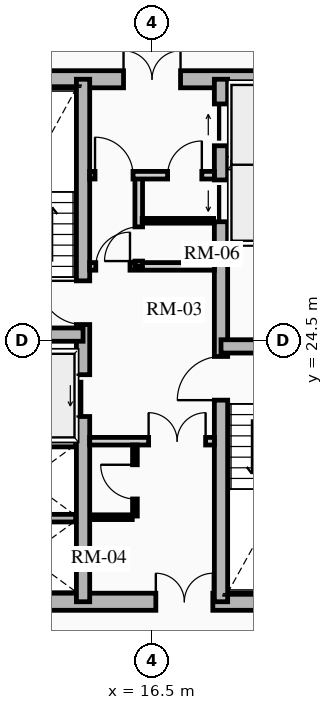
"""IFC4 building model, lengths in metres.
Left out: names, types, materials, properties, quantities, classifications, styles, units other than length and angle.
Written with IfcOpenShell. Run it as: python <this file> out.ifc"""

import sys

from ifc_helpers import new_model, si_unit, direction, frame, frame_2d, origin, place, context, subcontext, project, spatial, rectangle, extrude, source, transform, mapped, element, fill, save


model = new_model("IFC4")
c1 = context("Model", 3, precision=1e-05, world=origin(), true_north=direction((0.0, 1.0)))
c2 = subcontext(c1, "Body", "Model", "MODEL_VIEW")
j1 = project(units=[si_unit("LENGTHUNIT", "METRE"), si_unit("PLANEANGLEUNIT", "RADIAN")], contexts=[c1])
p1 = place(None, origin())
s1 = spatial("IfcSite", under=j1, at=p1, CompositionType="ELEMENT")
p2 = place(p1, origin())
s2 = spatial("IfcBuilding", under=s1, at=p2, CompositionType="ELEMENT")
p3 = place(p2, frame((0.0, 0.0, 107.98)))
s3 = spatial("IfcBuildingStorey", under=s2, at=p3, CompositionType="ELEMENT", Elevation=107.98)
p4 = place(p3, frame((11.15, 17.625, 0.0), z_axis=(0.0, 0.0, 1.0), x_axis=(1.0, 0.0, 0.0)))
e1 = element("IfcWall", 1, at=p4, inside=s3, PredefinedType="SHEAR", context=c2, shape_type="SweptSolid", body=[
    extrude(rectangle(XDim=10.7, YDim=0.45, at=frame_2d((5.35, 0.0))), origin(), (0.0, 0.0, 1.0), 2.91),
])
m1 = source(origin(), c2, "Body", "SweptSolid", [
    extrude(rectangle(XDim=1.5, YDim=2.02, at=frame_2d((0.75, 1.01))), frame((0.0, 0.235, 0.0), z_axis=(0.0, -1.0, 0.0), x_axis=(1.0, 0.0, 0.0)), (0.0, 0.0, 1.0), 0.47),
])
p5 = place(p4, frame((5.45, 0.0, 0.0)))
e2 = element("IfcOpeningElement", 2, at=p5, cuts=e1, PredefinedType="OPENING", context=c2, shape_type="MappedRepresentation", body=[
    mapped(m1, transform((0.0, 0.0, 0.0), x_axis=(1.0, 0.0, 0.0), y_axis=(0.0, 1.0, 0.0), z_axis=(0.0, 0.0, 1.0), scale=1.0)),
])
p6 = place(p3, frame((11.15, 31.375, 0.0), z_axis=(0.0, 0.0, 1.0), x_axis=(1.0, 0.0, 0.0)))
e3 = element("IfcWall", 3, at=p6, inside=s3, PredefinedType="SHEAR", context=c2, shape_type="SweptSolid", body=[
    extrude(rectangle(XDim=10.7, YDim=0.45, at=frame_2d((5.35, 0.0))), origin(), (0.0, 0.0, 1.0), 2.91),
])
p7 = place(p6, frame((4.6, 0.0, 0.0)))
e4 = element("IfcOpeningElement", 4, at=p7, cuts=e3, PredefinedType="OPENING", context=c2, shape_type="MappedRepresentation", body=[
    mapped(m1, transform((0.0, 0.0, 0.0), x_axis=(1.0, 0.0, 0.0), y_axis=(0.0, 1.0, 0.0), z_axis=(0.0, 0.0, 1.0), scale=1.0)),
])
p8 = place(p3, frame((14.685, 17.625, 0.0), z_axis=(0.0, 0.0, 1.0), x_axis=(0.0, 1.0, 0.0)))
e5 = element("IfcWall", 5, at=p8, inside=s3, PredefinedType="SHEAR", context=c2, shape_type="SweptSolid", body=[
    extrude(rectangle(XDim=13.75, YDim=0.35, at=frame_2d((6.875, 0.0))), origin(), (0.0, 0.0, 1.0), 2.91),
])
m2 = source(origin(), c2, "Body", "SweptSolid", [
    extrude(rectangle(XDim=1.1, YDim=2.015, at=frame_2d((0.55, 1.007))), frame((0.0, 0.185, 0.0), z_axis=(0.0, -1.0, 0.0), x_axis=(1.0, 0.0, 0.0)), (0.0, 0.0, 1.0), 0.37),
])
p9 = place(p8, frame((4.875, 0.0, 0.0)))
e6 = element("IfcOpeningElement", 6, at=p9, cuts=e5, PredefinedType="OPENING", context=c2, shape_type="MappedRepresentation", body=[
    mapped(m2, transform((0.0, 0.0, 0.0), x_axis=(1.0, 0.0, 0.0), y_axis=(0.0, 1.0, 0.0), z_axis=(0.0, 0.0, 1.0), scale=1.0)),
])
m3 = source(origin(), c2, "Body", "SweptSolid", [
    extrude(rectangle(XDim=1.15, YDim=2.02, at=frame_2d((0.575, 1.01))), frame((0.0, 0.185, 0.0), z_axis=(0.0, -1.0, 0.0), x_axis=(1.0, 0.0, 0.0)), (0.0, 0.0, 1.0), 0.37),
])
p10 = place(p8, frame((7.295, 0.0, 0.0)))
e7 = element("IfcOpeningElement", 7, at=p10, cuts=e5, PredefinedType="OPENING", context=c2, shape_type="MappedRepresentation", body=[
    mapped(m3, transform((0.0, 0.0, 0.0), x_axis=(1.0, 0.0, 0.0), y_axis=(0.0, 1.0, 0.0), z_axis=(0.0, 0.0, 1.0), scale=1.0)),
])
p11 = place(p3, frame((18.315, 17.625, 0.0), z_axis=(0.0, 0.0, 1.0), x_axis=(0.0, 1.0, 0.0)))
e8 = element("IfcWall", 8, at=p11, inside=s3, PredefinedType="SHEAR", context=c2, shape_type="SweptSolid", body=[
    extrude(rectangle(XDim=13.75, YDim=0.35, at=frame_2d((6.875, 0.0))), origin(), (0.0, 0.0, 1.0), 2.91),
])
p12 = place(p11, frame((10.0, 0.0, 0.0)))
e9 = element("IfcOpeningElement", 9, at=p12, cuts=e8, PredefinedType="OPENING", context=c2, shape_type="MappedRepresentation", body=[
    mapped(m2, transform((0.0, 0.0, 0.0), x_axis=(1.0, 0.0, 0.0), y_axis=(0.0, 1.0, 0.0), z_axis=(0.0, 0.0, 1.0), scale=1.0)),
])
p13 = place(p11, frame((12.0, 0.0, 0.0)))
e10 = element("IfcOpeningElement", 10, at=p13, cuts=e8, PredefinedType="OPENING", context=c2, shape_type="MappedRepresentation", body=[
    mapped(m2, transform((0.0, 0.0, 0.0), x_axis=(1.0, 0.0, 0.0), y_axis=(0.0, 1.0, 0.0), z_axis=(0.0, 0.0, 1.0), scale=1.0)),
])
p14 = place(p11, frame((5.305, 0.0, 0.0)))
e11 = element("IfcOpeningElement", 11, at=p14, cuts=e8, PredefinedType="OPENING", context=c2, shape_type="MappedRepresentation", body=[
    mapped(m3, transform((0.0, 0.0, 0.0), x_axis=(1.0, 0.0, 0.0), y_axis=(0.0, 1.0, 0.0), z_axis=(0.0, 0.0, 1.0), scale=1.0)),
])
for number, where, z_axis, x_axis in (
    (12, (11.4, 24.655, 0.0), (0.0, 0.0, 1.0), (1.0, 0.0, 0.0)),
    (13, (18.315, 24.345, 0.0), (0.0, 0.0, 1.0), (1.0, 0.0, 0.0)),
):
    element("IfcWall", number, at=place(p3, frame(where, z_axis=z_axis, x_axis=x_axis)), inside=s3, PredefinedType="SHEAR", context=c2, shape_type="SweptSolid", body=[
        extrude(rectangle(XDim=3.285, YDim=0.35, at=frame_2d((1.643, 0.0))), origin(), (0.0, 0.0, 1.0), 2.91),
    ])
for number, where, z_axis, x_axis in (
    (14, (11.52, 21.8, 0.0), (0.0, 0.0, 1.0), (1.0, 0.0, 0.0)),
    (15, (11.52, 19.825, 0.0), (0.0, 0.0, 1.0), (1.0, 0.0, 0.0)),
    (16, (18.51, 27.13, 0.0), (0.0, 0.0, 1.0), (1.0, 0.0, 0.0)),
    (17, (18.51, 29.175, 0.0), (0.0, 0.0, 1.0), (1.0, 0.0, 0.0)),
):
    element("IfcWall", number, at=place(p3, frame(where, z_axis=z_axis, x_axis=x_axis)), inside=s3, PredefinedType="SHEAR", context=c2, shape_type="SweptSolid", body=[
        extrude(rectangle(XDim=2.97, YDim=0.2, at=frame_2d((1.485, 0.0))), origin(), (0.0, 0.0, 1.0), 2.91),
    ])
p15 = place(p3, frame((14.86, 21.85, 0.0), z_axis=(0.0, 0.0, 1.0), x_axis=(1.0, 0.0, 0.0)))
e18 = element("IfcWall", 18, at=p15, inside=s3, PredefinedType="PARTITIONING", context=c2, shape_type="SweptSolid", body=[
    extrude(rectangle(XDim=3.28, YDim=0.2, at=frame_2d((1.64, 0.0))), origin(), (0.0, 0.0, 1.0), 2.655),
])
m4 = source(origin(), c2, "Body", "SweptSolid", [
    extrude(rectangle(XDim=1.5, YDim=2.02, at=frame_2d((0.75, 1.01))), frame((0.0, 0.11, 0.0), z_axis=(0.0, -1.0, 0.0), x_axis=(1.0, 0.0, 0.0)), (0.0, 0.0, 1.0), 0.22),
])
p16 = place(p15, frame((1.55, 0.0, 0.0)))
e19 = element("IfcOpeningElement", 19, at=p16, cuts=e18, PredefinedType="OPENING", context=c2, shape_type="MappedRepresentation", body=[
    mapped(m4, transform((0.0, 0.0, 0.0), x_axis=(1.0, 0.0, 0.0), y_axis=(0.0, 1.0, 0.0), z_axis=(0.0, 0.0, 1.0), scale=1.0)),
])
p17 = place(p3, frame((14.86, 26.45, 0.0), z_axis=(0.0, 0.0, 1.0), x_axis=(1.0, 0.0, 0.0)))
e20 = element("IfcWall", 20, at=p17, inside=s3, PredefinedType="PARTITIONING", context=c2, shape_type="SweptSolid", body=[
    extrude(rectangle(XDim=3.28, YDim=0.2, at=frame_2d((1.64, 0.0))), origin(), (0.0, 0.0, 1.0), 2.655),
])
m5 = source(origin(), c2, "Body", "SweptSolid", [
    extrude(rectangle(XDim=0.9, YDim=2.005, at=frame_2d((0.45, 1.002))), frame((0.0, 0.11, 0.0), z_axis=(0.0, -1.0, 0.0), x_axis=(1.0, 0.0, 0.0)), (0.0, 0.0, 1.0), 0.22),
])
p18 = place(p17, frame((0.16, 0.0, 0.0)))
e21 = element("IfcOpeningElement", 21, at=p18, cuts=e20, PredefinedType="OPENING", context=c2, shape_type="MappedRepresentation", body=[
    mapped(m5, transform((0.0, 0.0, 0.0), x_axis=(1.0, 0.0, 0.0), y_axis=(0.0, 1.0, 0.0), z_axis=(0.0, 0.0, 1.0), scale=1.0)),
])
p19 = place(p3, frame((16.15, 26.45, 0.0), z_axis=(0.0, 0.0, 1.0), x_axis=(0.0, 1.0, 0.0)))
e22 = element("IfcWall", 22, at=p19, inside=s3, PredefinedType="PARTITIONING", context=c2, shape_type="SweptSolid", body=[
    extrude(rectangle(XDim=2.4, YDim=0.2, at=frame_2d((1.2, 0.0))), origin(), (0.0, 0.0, 1.0), 2.655),
])
p20 = place(p19, frame((0.14, 0.0, 0.0)))
e23 = element("IfcOpeningElement", 23, at=p20, cuts=e22, PredefinedType="OPENING", context=c2, shape_type="MappedRepresentation", body=[
    mapped(m5, transform((0.0, 0.0, 0.0), x_axis=(1.0, 0.0, 0.0), y_axis=(0.0, 1.0, 0.0), z_axis=(0.0, 0.0, 1.0), scale=1.0)),
])
p21 = place(p3, frame((14.86, 28.85, 0.0), z_axis=(0.0, 0.0, 1.0), x_axis=(1.0, 0.0, 0.0)))
e24 = element("IfcWall", 24, at=p21, inside=s3, PredefinedType="PARTITIONING", context=c2, shape_type="SweptSolid", body=[
    extrude(rectangle(XDim=3.28, YDim=0.2, at=frame_2d((1.64, 0.0))), origin(), (0.0, 0.0, 1.0), 2.655),
])
m6 = source(origin(), c2, "Body", "SweptSolid", [
    extrude(rectangle(XDim=1.0, YDim=2.015, at=frame_2d((0.5, 1.007))), frame((0.0, 0.11, 0.0), z_axis=(0.0, -1.0, 0.0), x_axis=(1.0, 0.0, 0.0)), (0.0, 0.0, 1.0), 0.22),
])
p22 = place(p21, frame((0.14, 0.0, 0.0)))
e25 = element("IfcOpeningElement", 25, at=p22, cuts=e24, PredefinedType="OPENING", context=c2, shape_type="MappedRepresentation", body=[
    mapped(m6, transform((0.0, 0.0, 0.0), x_axis=(1.0, 0.0, 0.0), y_axis=(0.0, 1.0, 0.0), z_axis=(0.0, 0.0, 1.0), scale=1.0)),
])
p23 = place(p21, frame((2.05, 0.0, 0.0)))
e26 = element("IfcOpeningElement", 26, at=p23, cuts=e24, PredefinedType="OPENING", context=c2, shape_type="MappedRepresentation", body=[
    mapped(m5, transform((0.0, 0.0, 0.0), x_axis=(1.0, 0.0, 0.0), y_axis=(0.0, 1.0, 0.0), z_axis=(0.0, 0.0, 1.0), scale=1.0)),
])
p24 = place(p3, frame((16.05, 19.88, 0.0), z_axis=(0.0, 0.0, 1.0), x_axis=(0.0, 1.0, 0.0)))
e27 = element("IfcWall", 27, at=p24, inside=s3, PredefinedType="PARTITIONING", context=c2, shape_type="SweptSolid", body=[
    extrude(rectangle(XDim=1.87, YDim=0.125, at=frame_2d((0.935, 0.0))), origin(), (0.0, 0.0, 1.0), 2.655),
])
m7 = source(origin(), c2, "Body", "SweptSolid", [
    extrude(rectangle(XDim=0.9, YDim=2.005, at=frame_2d((0.45, 1.002))), frame((0.0, 0.073, 0.0), z_axis=(0.0, -1.0, 0.0), x_axis=(1.0, 0.0, 0.0)), (0.0, 0.0, 1.0), 0.145),
])
p25 = place(p24, frame((0.45, 0.0, 0.0)))
e28 = element("IfcOpeningElement", 28, at=p25, cuts=e27, PredefinedType="OPENING", context=c2, shape_type="MappedRepresentation", body=[
    mapped(m7, transform((0.0, 0.0, 0.0), x_axis=(1.0, 0.0, 0.0), y_axis=(0.0, 1.0, 0.0), z_axis=(0.0, 0.0, 1.0), scale=1.0)),
])
p26 = place(p3, frame((14.88, 19.85, 0.0), z_axis=(0.0, 0.0, 1.0), x_axis=(1.0, 0.0, 0.0)))
e29 = element("IfcWall", 29, at=p26, inside=s3, PredefinedType="PARTITIONING", context=c2, shape_type="SweptSolid", body=[
    extrude(rectangle(XDim=1.1, YDim=0.125, at=frame_2d((0.55, 0.0))), origin(), (0.0, 0.0, 1.0), 2.655),
])
p27 = place(p3, frame((16.24, 27.65, 0.0), z_axis=(0.0, 0.0, 1.0), x_axis=(1.0, 0.0, 0.0)))
e30 = element("IfcWall", 30, at=p27, inside=s3, PredefinedType="PARTITIONING", context=c2, shape_type="SweptSolid", body=[
    extrude(rectangle(XDim=1.88, YDim=0.125, at=frame_2d((0.94, 0.0))), origin(), (0.0, 0.0, 1.0), 2.655),
])
m8 = source(origin(), c2, "Body", "SweptSolid", [
    extrude(rectangle(XDim=1.1, YDim=2.015, at=frame_2d((0.55, 1.007))), frame((0.0, 0.025, 0.0), z_axis=(0.0, -1.0, 0.0), x_axis=(1.0, 0.0, 0.0)), (0.0, 0.0, 1.0), 0.05),
])
p28 = place(p9, origin())
e31 = element("IfcDoor", 31, at=p28, inside=s3, OperationType="SLIDING_TO_LEFT", PredefinedType="DOOR", context=c2, shape_type="MappedRepresentation", body=[
    mapped(m8, transform((0.0, 0.0, 0.0), x_axis=(1.0, 0.0, 0.0), y_axis=(0.0, 1.0, 0.0), z_axis=(0.0, 0.0, 1.0), scale=1.0)),
])
fill(e6, e31)
p29 = place(p12, origin())
e32 = element("IfcDoor", 32, at=p29, inside=s3, OperationType="SLIDING_TO_LEFT", PredefinedType="DOOR", context=c2, shape_type="MappedRepresentation", body=[
    mapped(m8, transform((0.0, 0.0, 0.0), x_axis=(1.0, 0.0, 0.0), y_axis=(0.0, 1.0, 0.0), z_axis=(0.0, 0.0, 1.0), scale=1.0)),
])
fill(e9, e32)
p30 = place(p13, origin())
e33 = element("IfcDoor", 33, at=p30, inside=s3, OperationType="SLIDING_TO_RIGHT", PredefinedType="DOOR", context=c2, shape_type="MappedRepresentation", body=[
    mapped(m8, transform((0.0, 0.0, 0.0), x_axis=(1.0, 0.0, 0.0), y_axis=(0.0, 1.0, 0.0), z_axis=(0.0, 0.0, 1.0), scale=1.0)),
])
fill(e10, e33)
m9 = source(origin(), c2, "Body", "SweptSolid", [
    extrude(rectangle(XDim=1.15, YDim=2.02, at=frame_2d((0.575, 1.01))), frame((0.0, 0.025, 0.0), z_axis=(0.0, -1.0, 0.0), x_axis=(1.0, 0.0, 0.0)), (0.0, 0.0, 1.0), 0.05),
])
p31 = place(p10, origin())
e34 = element("IfcDoor", 34, at=p31, inside=s3, OperationType="SINGLE_SWING_RIGHT", PredefinedType="DOOR", context=c2, shape_type="MappedRepresentation", body=[
    mapped(m9, transform((0.0, 0.0, 0.0), x_axis=(1.0, 0.0, 0.0), y_axis=(0.0, 1.0, 0.0), z_axis=(0.0, 0.0, 1.0), scale=1.0)),
])
fill(e7, e34)
p32 = place(p14, origin())
e35 = element("IfcDoor", 35, at=p32, inside=s3, OperationType="SINGLE_SWING_LEFT", PredefinedType="DOOR", context=c2, shape_type="MappedRepresentation", body=[
    mapped(m9, transform((0.0, 0.0, 0.0), x_axis=(1.0, 0.0, 0.0), y_axis=(0.0, 1.0, 0.0), z_axis=(0.0, 0.0, 1.0), scale=1.0)),
])
fill(e11, e35)
m10 = source(origin(), c2, "Body", "SweptSolid", [
    extrude(rectangle(XDim=1.5, YDim=2.02, at=frame_2d((0.75, 1.01))), frame((0.0, 0.025, 0.0), z_axis=(0.0, -1.0, 0.0), x_axis=(1.0, 0.0, 0.0)), (0.0, 0.0, 1.0), 0.05),
])
p33 = place(p7, origin())
e36 = element("IfcDoor", 36, at=p33, inside=s3, OperationType="DOUBLE_DOOR_SINGLE_SWING", PredefinedType="DOOR", context=c2, shape_type="MappedRepresentation", body=[
    mapped(m10, transform((0.0, 0.0, 0.0), x_axis=(1.0, 0.0, 0.0), y_axis=(0.0, 1.0, 0.0), z_axis=(0.0, 0.0, 1.0), scale=1.0)),
])
fill(e4, e36)
p34 = place(p5, origin())
e37 = element("IfcDoor", 37, at=p34, inside=s3, OperationType="DOUBLE_DOOR_SINGLE_SWING", PredefinedType="DOOR", context=c2, shape_type="MappedRepresentation", body=[
    mapped(m10, transform((0.0, 0.0, 0.0), x_axis=(1.0, 0.0, 0.0), y_axis=(0.0, 1.0, 0.0), z_axis=(0.0, 0.0, 1.0), scale=1.0)),
])
fill(e2, e37)
p35 = place(p16, origin())
e38 = element("IfcDoor", 38, at=p35, inside=s3, OperationType="DOUBLE_DOOR_SINGLE_SWING", PredefinedType="DOOR", context=c2, shape_type="MappedRepresentation", body=[
    mapped(m10, transform((0.0, 0.0, 0.0), x_axis=(1.0, 0.0, 0.0), y_axis=(0.0, 1.0, 0.0), z_axis=(0.0, 0.0, 1.0), scale=1.0)),
])
fill(e19, e38)
m11 = source(origin(), c2, "Body", "SweptSolid", [
    extrude(rectangle(XDim=0.9, YDim=2.005, at=frame_2d((0.45, 1.002))), frame((0.0, 0.025, 0.0), z_axis=(0.0, -1.0, 0.0), x_axis=(1.0, 0.0, 0.0)), (0.0, 0.0, 1.0), 0.05),
])
p36 = place(p18, origin())
e39 = element("IfcDoor", 39, at=p36, inside=s3, OperationType="SINGLE_SWING_RIGHT", PredefinedType="DOOR", context=c2, shape_type="MappedRepresentation", body=[
    mapped(m11, transform((0.0, 0.0, 0.0), x_axis=(1.0, 0.0, 0.0), y_axis=(0.0, 1.0, 0.0), z_axis=(0.0, 0.0, 1.0), scale=1.0)),
])
fill(e21, e39)
m12 = source(origin(), c2, "Body", "SweptSolid", [
    extrude(rectangle(XDim=1.0, YDim=2.015, at=frame_2d((0.5, 1.007))), frame((0.0, 0.025, 0.0), z_axis=(0.0, -1.0, 0.0), x_axis=(1.0, 0.0, 0.0)), (0.0, 0.0, 1.0), 0.05),
])
p37 = place(p22, origin())
e40 = element("IfcDoor", 40, at=p37, inside=s3, OperationType="SINGLE_SWING_LEFT", PredefinedType="DOOR", context=c2, shape_type="MappedRepresentation", body=[
    mapped(m12, transform((0.0, 0.0, 0.0), x_axis=(1.0, 0.0, 0.0), y_axis=(0.0, 1.0, 0.0), z_axis=(0.0, 0.0, 1.0), scale=1.0)),
])
fill(e25, e40)
p38 = place(p25, origin())
e41 = element("IfcDoor", 41, at=p38, inside=s3, OperationType="SINGLE_SWING_RIGHT", PredefinedType="DOOR", context=c2, shape_type="MappedRepresentation", body=[
    mapped(m11, transform((0.0, 0.0, 0.0), x_axis=(1.0, 0.0, 0.0), y_axis=(0.0, 1.0, 0.0), z_axis=(0.0, 0.0, 1.0), scale=1.0)),
])
fill(e28, e41)
p39 = place(p20, origin())
e42 = element("IfcDoor", 42, at=p39, inside=s3, OperationType="SINGLE_SWING_LEFT", PredefinedType="DOOR", context=c2, shape_type="MappedRepresentation", body=[
    mapped(m11, transform((0.0, 0.0, 0.0), x_axis=(1.0, 0.0, 0.0), y_axis=(0.0, 1.0, 0.0), z_axis=(0.0, 0.0, 1.0), scale=1.0)),
])
fill(e23, e42)
p40 = place(p23, origin())
e43 = element("IfcDoor", 43, at=p40, inside=s3, OperationType="SINGLE_SWING_RIGHT", PredefinedType="DOOR", context=c2, shape_type="MappedRepresentation", body=[
    mapped(m11, transform((0.0, 0.0, 0.0), x_axis=(1.0, 0.0, 0.0), y_axis=(0.0, 1.0, 0.0), z_axis=(0.0, 0.0, 1.0), scale=1.0)),
])
fill(e26, e43)
save(model, sys.argv[1])
